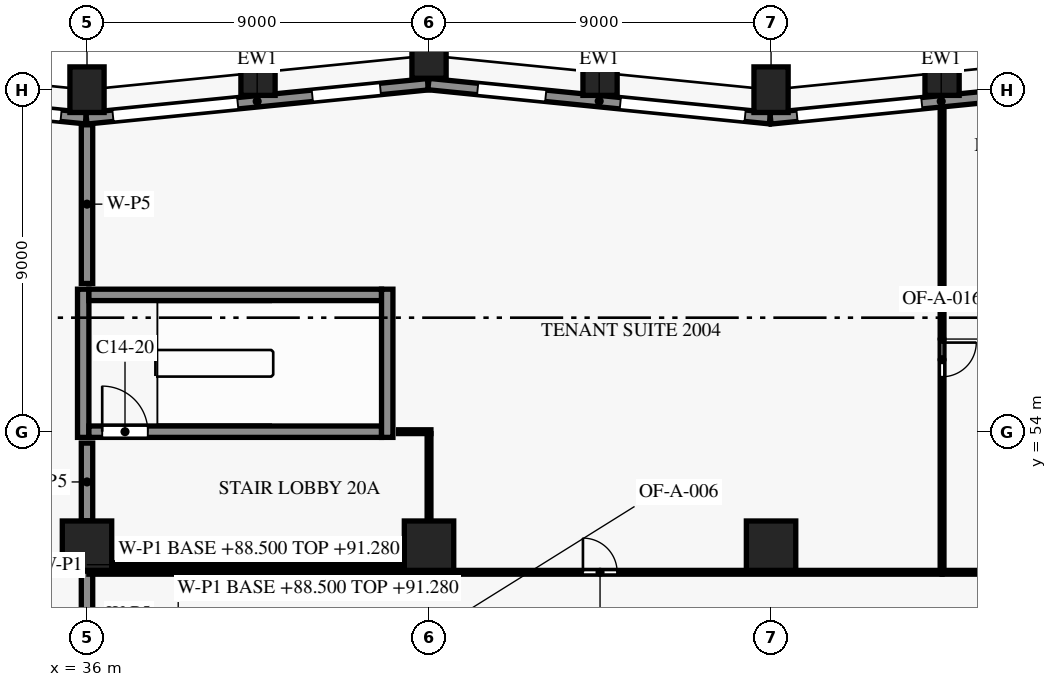
"""IFC4 building model, lengths in metres.
Left out: names, types, materials, properties, quantities, classifications, styles, units other than length and angle.
Written with IfcOpenShell. Run it as: python <this file> out.ifc"""

import sys

from ifc_helpers import new_model, si_unit, direction, frame, frame_2d, origin, origin_2d, place, context, subcontext, project, spatial, rectangle, extrude, element, fill, save


model = new_model("IFC4")
c1 = context("Model", 3, precision=1e-05, world=origin(), true_north=direction((0.0, 1.0)))
c2 = subcontext(c1, "Body", "Model", "MODEL_VIEW")
j1 = project(units=[si_unit("LENGTHUNIT", "METRE"), si_unit("PLANEANGLEUNIT", "RADIAN")], contexts=[c1])
p1 = place(None, origin())
s1 = spatial("IfcSite", under=j1, at=p1, CompositionType="ELEMENT")
p2 = place(p1, origin())
s2 = spatial("IfcBuilding", under=s1, at=p2, CompositionType="ELEMENT")
p3 = place(p2, frame((0.0, 0.0, 88.5)))
s3 = spatial("IfcBuildingStorey", under=s2, at=p3, CompositionType="ELEMENT", Elevation=88.5)
for number, where, z_axis, x_axis in (
    (1, (58.5, 63.45, 0.0), (0.0, 0.0, 1.0), (-0.995, -0.1, 0.0)),
    (2, (54.0, 63.0, 0.0), (0.0, 0.0, 1.0), (-1.0, 0.0, 0.0)),
    (3, (49.5, 63.45, 0.0), (0.0, 0.0, 1.0), (-0.995, 0.1, 0.0)),
    (4, (45.0, 63.9, 0.0), (0.0, 0.0, 1.0), (-1.0, 0.0, 0.0)),
    (5, (40.5, 63.45, 0.0), (0.0, 0.0, 1.0), (-0.995, -0.1, 0.0)),
    (6, (36.0, 63.0, 0.0), (0.0, 0.0, 1.0), (-1.0, 0.0, 0.0)),
):
    element("IfcColumn", number, at=place(p3, frame(where, z_axis=z_axis, x_axis=x_axis)), inside=s3, PredefinedType="COLUMN", context=c2, shape_type="SweptSolid", body=[
        extrude(rectangle(XDim=0.9, YDim=1.2, at=origin_2d()), origin(), (0.0, 0.0, 1.0), 3.8),
    ])
for number, where, z_axis, x_axis in (
    (7, (36.0, 51.0, 0.0), (0.0, 0.0, 1.0), (1.0, 0.0, 0.0)),
    (8, (45.0, 51.0, 0.0), (0.0, 0.0, 1.0), (1.0, 0.0, 0.0)),
    (9, (54.0, 51.0, 0.0), (0.0, 0.0, 1.0), (1.0, 0.0, 0.0)),
):
    element("IfcColumn", number, at=place(p3, frame(where, z_axis=z_axis, x_axis=x_axis)), inside=s3, PredefinedType="COLUMN", context=c2, shape_type="SweptSolid", body=[
        extrude(rectangle(XDim=1.3, YDim=1.3, at=origin_2d()), origin(), (0.0, 0.0, 1.0), 3.8),
    ])
p4 = place(p3, frame((53.985, 62.245, 0.0), z_axis=(0.0, 0.0, 1.0), x_axis=(0.995037993253, 0.099495688264, 0.0)))
e10 = element("IfcWall", 10, at=p4, inside=s3, PredefinedType="SOLIDWALL", context=c2, shape_type="SweptSolid", body=[
    extrude(rectangle(XDim=9.03, YDim=0.3, at=frame_2d((4.515, 0.0))), origin(), (0.0, 0.0, 1.0), 3.15),
])
p5 = place(p4, frame((0.701, 0.0, 0.15)))
e11 = element("IfcOpeningElement", 11, at=p5, cuts=e10, PredefinedType="OPENING", context=c2, shape_type="SweptSolid", body=[
    extrude(rectangle(XDim=3.3, YDim=2.4, at=frame_2d((1.65, 1.2))), frame((0.0, 0.16, 0.0), z_axis=(0.0, -1.0, 0.0), x_axis=(1.0, 0.0, 0.0)), (0.0, 0.0, 1.0), 0.32),
])
p6 = place(p4, frame((5.974, 0.0, 0.75)))
e12 = element("IfcOpeningElement", 12, at=p6, cuts=e10, PredefinedType="OPENING", context=c2, shape_type="SweptSolid", body=[
    extrude(rectangle(XDim=1.8, YDim=1.8, at=frame_2d((0.9, 0.9))), frame((0.0, 0.16, 0.0), z_axis=(0.0, -1.0, 0.0), x_axis=(1.0, 0.0, 0.0)), (0.0, 0.0, 1.0), 0.32),
])
p7 = place(p3, frame((44.985, 63.148, 0.0), z_axis=(0.0, 0.0, 1.0), x_axis=(0.995037993253, -0.099495688264, 0.0)))
e13 = element("IfcWall", 13, at=p7, inside=s3, PredefinedType="SOLIDWALL", context=c2, shape_type="SweptSolid", body=[
    extrude(rectangle(XDim=9.03, YDim=0.3, at=frame_2d((4.515, 0.0))), origin(), (0.0, 0.0, 1.0), 3.15),
])
p8 = place(p7, frame((1.301, 0.0, 0.75)))
e14 = element("IfcOpeningElement", 14, at=p8, cuts=e13, PredefinedType="OPENING", context=c2, shape_type="SweptSolid", body=[
    extrude(rectangle(XDim=1.8, YDim=1.8, at=frame_2d((0.9, 0.9))), frame((0.0, 0.16, 0.0), z_axis=(0.0, -1.0, 0.0), x_axis=(1.0, 0.0, 0.0)), (0.0, 0.0, 1.0), 0.32),
])
p9 = place(p7, frame((5.073, 0.0, 0.15)))
e15 = element("IfcOpeningElement", 15, at=p9, cuts=e13, PredefinedType="OPENING", context=c2, shape_type="SweptSolid", body=[
    extrude(rectangle(XDim=3.3, YDim=2.4, at=frame_2d((1.65, 1.2))), frame((0.0, 0.16, 0.0), z_axis=(0.0, -1.0, 0.0), x_axis=(1.0, 0.0, 0.0)), (0.0, 0.0, 1.0), 0.32),
])
p10 = place(p3, frame((35.985, 62.245, 0.0), z_axis=(0.0, 0.0, 1.0), x_axis=(0.995037993253, 0.099495688264, 0.0)))
e16 = element("IfcWall", 16, at=p10, inside=s3, PredefinedType="SOLIDWALL", context=c2, shape_type="SweptSolid", body=[
    extrude(rectangle(XDim=9.03, YDim=0.3, at=frame_2d((4.515, 0.0))), origin(), (0.0, 0.0, 1.0), 3.15),
])
p11 = place(p10, frame((0.701, 0.0, 0.15)))
e17 = element("IfcOpeningElement", 17, at=p11, cuts=e16, PredefinedType="OPENING", context=c2, shape_type="SweptSolid", body=[
    extrude(rectangle(XDim=3.3, YDim=2.4, at=frame_2d((1.65, 1.2))), frame((0.0, 0.16, 0.0), z_axis=(0.0, -1.0, 0.0), x_axis=(1.0, 0.0, 0.0)), (0.0, 0.0, 1.0), 0.32),
])
p12 = place(p10, frame((5.974, 0.0, 0.75)))
e18 = element("IfcOpeningElement", 18, at=p12, cuts=e16, PredefinedType="OPENING", context=c2, shape_type="SweptSolid", body=[
    extrude(rectangle(XDim=1.8, YDim=1.8, at=frame_2d((0.9, 0.9))), frame((0.0, 0.16, 0.0), z_axis=(0.0, -1.0, 0.0), x_axis=(1.0, 0.0, 0.0)), (0.0, 0.0, 1.0), 0.32),
])
p13 = place(p3, frame((27.075, 63.139, 0.0), z_axis=(0.0, 0.0, 1.0), x_axis=(0.995036108601, -0.099514534519, 0.0)))
e19 = element("IfcWall", 19, at=p13, inside=s3, PredefinedType="SOLIDWALL", context=c2, shape_type="SweptSolid", body=[
    extrude(rectangle(XDim=8.94, YDim=0.3, at=frame_2d((4.47, 0.0))), origin(), (0.0, 0.0, 1.0), 3.15),
])
p14 = place(p13, frame((1.211, 0.0, 0.75)))
e20 = element("IfcOpeningElement", 20, at=p14, cuts=e19, PredefinedType="OPENING", context=c2, shape_type="SweptSolid", body=[
    extrude(rectangle(XDim=1.8, YDim=1.8, at=frame_2d((0.9, 0.9))), frame((0.0, 0.16, 0.0), z_axis=(0.0, -1.0, 0.0), x_axis=(1.0, 0.0, 0.0)), (0.0, 0.0, 1.0), 0.32),
])
p15 = place(p13, frame((4.984, 0.0, 0.15)))
e21 = element("IfcOpeningElement", 21, at=p15, cuts=e19, PredefinedType="OPENING", context=c2, shape_type="SweptSolid", body=[
    extrude(rectangle(XDim=3.3, YDim=2.4, at=frame_2d((1.65, 1.2))), frame((0.0, 0.16, 0.0), z_axis=(0.0, -1.0, 0.0), x_axis=(1.0, 0.0, 0.0)), (0.0, 0.0, 1.0), 0.32),
])
p16 = place(p3, frame((36.05, 54.0, 0.0), z_axis=(0.0, 0.0, 1.0), x_axis=(1.0, 0.0, 0.0)))
e22 = element("IfcWall", 22, at=p16, inside=s3, PredefinedType="SHEAR", context=c2, shape_type="SweptSolid", body=[
    extrude(rectangle(XDim=7.7, YDim=0.3, at=frame_2d((3.85, 0.0))), origin(), (0.0, 0.0, 1.0), 3.5),
])
p17 = place(p16, frame((0.35, 0.0, 0.0)))
e23 = element("IfcOpeningElement", 23, at=p17, cuts=e22, PredefinedType="OPENING", context=c2, shape_type="SweptSolid", body=[
    extrude(rectangle(XDim=1.2, YDim=2.2, at=frame_2d((0.6, 1.1))), frame((0.0, 0.16, 0.0), z_axis=(0.0, -1.0, 0.0), x_axis=(1.0, 0.0, 0.0)), (0.0, 0.0, 1.0), 0.32),
])
p18 = place(p3, frame((36.05, 57.6, 0.0), z_axis=(0.0, 0.0, 1.0), x_axis=(1.0, 0.0, 0.0)))
e24 = element("IfcWall", 24, at=p18, inside=s3, PredefinedType="SHEAR", context=c2, shape_type="SweptSolid", body=[
    extrude(rectangle(XDim=7.7, YDim=0.3, at=frame_2d((3.85, 0.0))), origin(), (0.0, 0.0, 1.0), 3.5),
])
for number, where, z_axis, x_axis in (
    (25, (35.9, 53.85, 0.0), (0.0, 0.0, 1.0), (0.0, 1.0, 0.0)),
    (26, (43.9, 53.85, 0.0), (0.0, 0.0, 1.0), (0.0, 1.0, 0.0)),
):
    element("IfcWall", number, at=place(p3, frame(where, z_axis=z_axis, x_axis=x_axis)), inside=s3, PredefinedType="SHEAR", context=c2, shape_type="SweptSolid", body=[
        extrude(rectangle(XDim=3.9, YDim=0.3, at=frame_2d((1.95, 0.0))), origin(), (0.0, 0.0, 1.0), 3.5),
    ])
p19 = place(p3, frame((36.0, 48.05, 0.0), z_axis=(0.0, 0.0, 1.0), x_axis=(0.0, 1.0, 0.0)))
e27 = element("IfcWall", 27, at=p19, inside=s3, PredefinedType="PARTITIONING", context=c2, shape_type="SweptSolid", body=[
    extrude(rectangle(XDim=2.28, YDim=0.3, at=frame_2d((1.14, 0.0))), origin(), (0.0, 0.0, 1.0), 2.78),
])
p20 = place(p3, frame((36.05, 50.3, 0.0), z_axis=(0.0, 0.0, 1.0), x_axis=(1.0, 0.0, 0.0)))
e28 = element("IfcWall", 28, at=p20, inside=s3, PredefinedType="PARTITIONING", context=c2, shape_type="SweptSolid", body=[
    extrude(rectangle(XDim=8.95, YDim=0.1, at=frame_2d((4.475, 0.0))), origin(), (0.0, 0.0, 1.0), 2.78),
])
p21 = place(p3, frame((45.0, 50.3, 0.0), z_axis=(0.0, 0.0, 1.0), x_axis=(1.0, 0.0, 0.0)))
e29 = element("IfcWall", 29, at=p21, inside=s3, PredefinedType="PARTITIONING", context=c2, shape_type="SweptSolid", body=[
    extrude(rectangle(XDim=13.5, YDim=0.1, at=frame_2d((6.75, 0.0))), origin(), (0.0, 0.0, 1.0), 2.88),
])
p22 = place(p21, frame((4.05, 0.0, 0.0)))
e30 = element("IfcOpeningElement", 30, at=p22, cuts=e29, PredefinedType="OPENING", context=c2, shape_type="SweptSolid", body=[
    extrude(rectangle(XDim=0.9, YDim=2.1, at=frame_2d((0.45, 1.05))), frame((0.0, 0.06, 0.0), z_axis=(0.0, -1.0, 0.0), x_axis=(1.0, 0.0, 0.0)), (0.0, 0.0, 1.0), 0.12),
])
p23 = place(p3, frame((58.5, 50.3, 0.0), z_axis=(0.0, 0.0, 1.0), x_axis=(1.0, 0.0, 0.0)))
e31 = element("IfcWall", 31, at=p23, inside=s3, PredefinedType="PARTITIONING", context=c2, shape_type="SweptSolid", body=[
    extrude(rectangle(XDim=4.5, YDim=0.1, at=frame_2d((2.25, 0.0))), origin(), (0.0, 0.0, 1.0), 2.88),
])
p24 = place(p3, frame((44.345, 50.5, 0.0), z_axis=(0.0, 0.0, 1.0), x_axis=(-1.0, 0.0, 0.0)))
e32 = element("IfcWall", 32, at=p24, inside=s3, PredefinedType="PARTITIONING", context=c2, shape_type="SweptSolid", body=[
    extrude(rectangle(XDim=7.69, YDim=0.1, at=frame_2d((3.845, 0.0))), origin(), (0.0, 0.0, 1.0), 3.48),
])
p25 = place(p3, frame((36.0, 51.655, 0.0), z_axis=(0.0, 0.0, 1.0), x_axis=(0.0, 1.0, 0.0)))
e33 = element("IfcWall", 33, at=p25, inside=s3, PredefinedType="PARTITIONING", context=c2, shape_type="SweptSolid", body=[
    extrude(rectangle(XDim=2.045, YDim=0.3, at=frame_2d((1.022, 0.0))), origin(), (0.0, 0.0, 1.0), 2.78),
])
p26 = place(p3, frame((45.0, 53.95, 0.0), z_axis=(0.0, 0.0, 1.0), x_axis=(0.0, -1.0, 0.0)))
e34 = element("IfcWall", 34, at=p26, inside=s3, PredefinedType="PARTITIONING", context=c2, shape_type="SweptSolid", body=[
    extrude(rectangle(XDim=2.295, YDim=0.1, at=frame_2d((1.147, 0.0))), origin(), (0.0, 0.0, 1.0), 2.88),
])
p27 = place(p3, frame((44.2, 54.0, 0.0), z_axis=(0.0, 0.0, 1.0), x_axis=(1.0, 0.0, 0.0)))
e35 = element("IfcWall", 35, at=p27, inside=s3, PredefinedType="PARTITIONING", context=c2, shape_type="SweptSolid", body=[
    extrude(rectangle(XDim=0.85, YDim=0.1, at=frame_2d((0.425, 0.0))), origin(), (0.0, 0.0, 1.0), 2.88),
])
p28 = place(p3, frame((36.0, 57.9, 0.0), z_axis=(0.0, 0.0, 1.0), x_axis=(0.0, 1.0, 0.0)))
e36 = element("IfcWall", 36, at=p28, inside=s3, PredefinedType="PARTITIONING", context=c2, shape_type="SweptSolid", body=[
    extrude(rectangle(XDim=4.176, YDim=0.3, at=frame_2d((2.088, 0.0))), origin(), (0.0, 0.0, 1.0), 2.78),
])
p29 = place(p3, frame((58.5, 62.525, 0.0), z_axis=(0.0, 0.0, 1.0), x_axis=(0.0, -1.0, 0.0)))
e37 = element("IfcWall", 37, at=p29, inside=s3, PredefinedType="PARTITIONING", context=c2, shape_type="SweptSolid", body=[
    extrude(rectangle(XDim=12.175, YDim=0.1, at=frame_2d((6.088, 0.0))), origin(), (0.0, 0.0, 1.0), 2.78),
])
p30 = place(p29, frame((6.18, 0.0, 0.0)))
e38 = element("IfcOpeningElement", 38, at=p30, cuts=e37, PredefinedType="OPENING", context=c2, shape_type="SweptSolid", body=[
    extrude(rectangle(XDim=0.9, YDim=2.1, at=frame_2d((0.45, 1.05))), frame((0.0, 0.06, 0.0), z_axis=(0.0, -1.0, 0.0), x_axis=(1.0, 0.0, 0.0)), (0.0, 0.0, 1.0), 0.12),
])
p31 = place(p5, origin())
e39 = element("IfcWindow", 39, at=p31, inside=s3, PartitioningType="SINGLE_PANEL", PredefinedType="WINDOW", context=c2, shape_type="SweptSolid", body=[
    extrude(rectangle(XDim=3.3, YDim=2.4, at=frame_2d((1.65, 1.2))), frame((0.0, 0.03, 0.0), z_axis=(0.0, -1.0, 0.0), x_axis=(1.0, 0.0, 0.0)), (0.0, 0.0, 1.0), 0.06),
])
fill(e11, e39)
p32 = place(p8, origin())
e40 = element("IfcWindow", 40, at=p32, inside=s3, PartitioningType="SINGLE_PANEL", PredefinedType="WINDOW", context=c2, shape_type="SweptSolid", body=[
    extrude(rectangle(XDim=1.8, YDim=1.8, at=frame_2d((0.9, 0.9))), frame((0.0, 0.03, 0.0), z_axis=(0.0, -1.0, 0.0), x_axis=(1.0, 0.0, 0.0)), (0.0, 0.0, 1.0), 0.06),
])
fill(e14, e40)
p33 = place(p9, origin())
e41 = element("IfcWindow", 41, at=p33, inside=s3, PartitioningType="SINGLE_PANEL", PredefinedType="WINDOW", context=c2, shape_type="SweptSolid", body=[
    extrude(rectangle(XDim=3.3, YDim=2.4, at=frame_2d((1.65, 1.2))), frame((0.0, 0.03, 0.0), z_axis=(0.0, -1.0, 0.0), x_axis=(1.0, 0.0, 0.0)), (0.0, 0.0, 1.0), 0.06),
])
fill(e15, e41)
p34 = place(p11, origin())
e42 = element("IfcWindow", 42, at=p34, inside=s3, PartitioningType="SINGLE_PANEL", PredefinedType="WINDOW", context=c2, shape_type="SweptSolid", body=[
    extrude(rectangle(XDim=3.3, YDim=2.4, at=frame_2d((1.65, 1.2))), frame((0.0, 0.03, 0.0), z_axis=(0.0, -1.0, 0.0), x_axis=(1.0, 0.0, 0.0)), (0.0, 0.0, 1.0), 0.06),
])
fill(e17, e42)
p35 = place(p12, origin())
e43 = element("IfcWindow", 43, at=p35, inside=s3, PartitioningType="SINGLE_PANEL", PredefinedType="WINDOW", context=c2, shape_type="SweptSolid", body=[
    extrude(rectangle(XDim=1.8, YDim=1.8, at=frame_2d((0.9, 0.9))), frame((0.0, 0.03, 0.0), z_axis=(0.0, -1.0, 0.0), x_axis=(1.0, 0.0, 0.0)), (0.0, 0.0, 1.0), 0.06),
])
fill(e18, e43)
p36 = place(p15, origin())
e44 = element("IfcWindow", 44, at=p36, inside=s3, PartitioningType="SINGLE_PANEL", PredefinedType="WINDOW", context=c2, shape_type="SweptSolid", body=[
    extrude(rectangle(XDim=3.3, YDim=2.4, at=frame_2d((1.65, 1.2))), frame((0.0, 0.03, 0.0), z_axis=(0.0, -1.0, 0.0), x_axis=(1.0, 0.0, 0.0)), (0.0, 0.0, 1.0), 0.06),
])
fill(e21, e44)
p37 = place(p17, origin())
e45 = element("IfcDoor", 45, at=p37, inside=s3, OperationType="SINGLE_SWING_LEFT", PredefinedType="DOOR", context=c2, shape_type="SweptSolid", body=[
    extrude(rectangle(XDim=1.2, YDim=2.2, at=frame_2d((0.6, 1.1))), frame((0.0, 0.025, 0.0), z_axis=(0.0, -1.0, 0.0), x_axis=(1.0, 0.0, 0.0)), (0.0, 0.0, 1.0), 0.05),
])
fill(e23, e45)
p38 = place(p22, origin())
e46 = element("IfcDoor", 46, at=p38, inside=s3, OperationType="SINGLE_SWING_LEFT", PredefinedType="DOOR", context=c2, shape_type="SweptSolid", body=[
    extrude(rectangle(XDim=0.9, YDim=2.1, at=frame_2d((0.45, 1.05))), frame((0.0, 0.025, 0.0), z_axis=(0.0, -1.0, 0.0), x_axis=(1.0, 0.0, 0.0)), (0.0, 0.0, 1.0), 0.05),
])
fill(e30, e46)
p39 = place(p30, origin())
e47 = element("IfcDoor", 47, at=p39, inside=s3, OperationType="SINGLE_SWING_LEFT", PredefinedType="DOOR", context=c2, shape_type="SweptSolid", body=[
    extrude(rectangle(XDim=0.9, YDim=2.1, at=frame_2d((0.45, 1.05))), frame((0.0, 0.025, 0.0), z_axis=(0.0, -1.0, 0.0), x_axis=(1.0, 0.0, 0.0)), (0.0, 0.0, 1.0), 0.05),
])
fill(e38, e47)
save(model, sys.argv[1])
